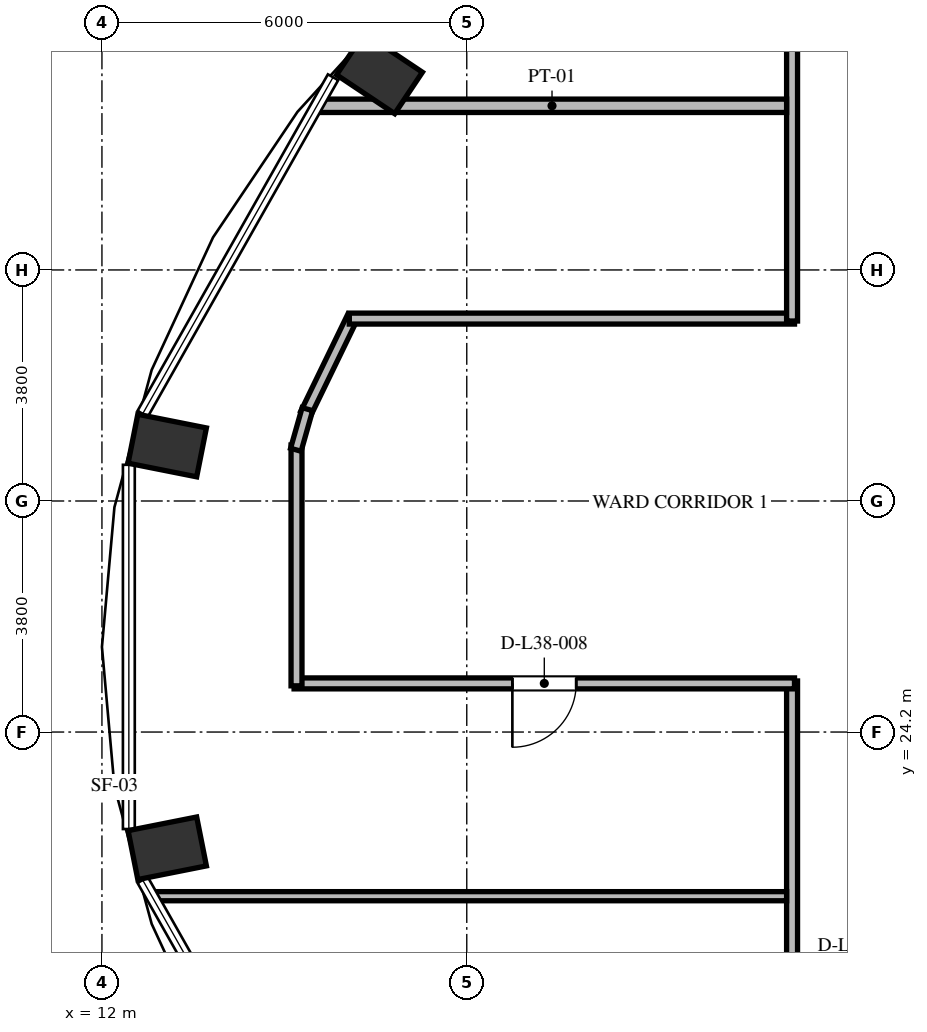
"""IFC4 building model, lengths in metres.
Left out: names, types, materials, properties, quantities, classifications, styles, units other than length and angle.
Written with IfcOpenShell. Run it as: python <this file> out.ifc"""

import sys

from ifc_helpers import new_model, si_unit, direction, frame, frame_2d, origin, origin_2d, place, context, subcontext, project, spatial, rectangle, extrude, element, fill, save


model = new_model("IFC4")
c1 = context("Model", 3, precision=1e-05, world=origin(), true_north=direction((0.0, 1.0)))
c2 = subcontext(c1, "Body", "Model", "MODEL_VIEW")
j1 = project(units=[si_unit("LENGTHUNIT", "METRE"), si_unit("PLANEANGLEUNIT", "RADIAN")], contexts=[c1])
p1 = place(None, origin())
s1 = spatial("IfcSite", under=j1, at=p1, CompositionType="ELEMENT")
p2 = place(p1, origin())
s2 = spatial("IfcBuilding", under=s1, at=p2, CompositionType="ELEMENT")
p3 = place(p2, frame((0.0, 0.0, 149.232)))
s3 = spatial("IfcBuildingStorey", under=s2, at=p3, CompositionType="ELEMENT", Elevation=149.232)
for number, where, z_axis, x_axis in (
    (1, (16.564, 35.031, 0.0), (0.0, 0.0, 1.0), (-0.831, 0.556, 0.0)),
    (2, (13.074, 28.912, 0.0), (0.0, 0.0, 1.0), (-0.981, 0.195, 0.0)),
    (3, (13.074, 22.288, 0.0), (0.0, 0.0, 1.0), (-0.981, -0.195, 0.0)),
):
    element("IfcColumn", number, at=place(p3, frame(where, z_axis=z_axis, x_axis=x_axis)), inside=s3, PredefinedType="COLUMN", context=c2, shape_type="SweptSolid", body=[
        extrude(rectangle(XDim=1.15, YDim=0.82, at=origin_2d()), origin(), (0.0, 0.0, 1.0), 3.648),
    ])
p4 = place(p3, frame((15.35, 29.436, 0.0), z_axis=(0.0, 0.0, 1.0), x_axis=(0.436196025907, 0.899851669434, 0.0)))
e4 = element("IfcWall", 4, at=p4, inside=s3, PredefinedType="PARTITIONING", context=c2, shape_type="SweptSolid", body=[
    extrude(rectangle(XDim=1.778, YDim=0.18, at=frame_2d((0.889, 0.0))), origin(), (0.0, 0.0, 1.0), 3.428),
])
p5 = place(p3, frame((16.068, 31.0, 0.0), z_axis=(0.0, 0.0, 1.0), x_axis=(1.0, 0.0, 0.0)))
e5 = element("IfcWall", 5, at=p5, inside=s3, PredefinedType="PARTITIONING", context=c2, shape_type="SweptSolid", body=[
    extrude(rectangle(XDim=7.322, YDim=0.18, at=frame_2d((3.661, 0.0))), origin(), (0.0, 0.0, 1.0), 3.428),
])
p6 = place(p3, frame((23.35, 30.96, 0.0), z_axis=(0.0, 0.0, 1.0), x_axis=(0.0, 1.0, 0.0)))
e6 = element("IfcWall", 6, at=p6, inside=s3, PredefinedType="PARTITIONING", context=c2, shape_type="SweptSolid", body=[
    extrude(rectangle(XDim=6.714, YDim=0.18, at=frame_2d((3.357, 0.0))), origin(), (0.0, 0.0, 1.0), 3.428),
])
p7 = place(p3, frame((23.35, 19.98, 0.0), z_axis=(0.0, 0.0, 1.0), x_axis=(0.0, 1.0, 0.0)))
e7 = element("IfcWall", 7, at=p7, inside=s3, PredefinedType="PARTITIONING", context=c2, shape_type="SweptSolid", body=[
    extrude(rectangle(XDim=5.06, YDim=0.18, at=frame_2d((2.53, 0.0))), origin(), (0.0, 0.0, 1.0), 3.428),
])
p8 = place(p3, frame((23.39, 25.0, 0.0), z_axis=(0.0, 0.0, 1.0), x_axis=(-1.0, 0.0, 0.0)))
e8 = element("IfcWall", 8, at=p8, inside=s3, PredefinedType="PARTITIONING", context=c2, shape_type="SweptSolid", body=[
    extrude(rectangle(XDim=8.23, YDim=0.18, at=frame_2d((4.115, 0.0))), origin(), (0.0, 0.0, 1.0), 3.428),
])
p9 = place(p8, frame((3.59, 0.0, 0.0)))
e9 = element("IfcOpeningElement", 9, at=p9, cuts=e8, PredefinedType="OPENING", context=c2, shape_type="SweptSolid", body=[
    extrude(rectangle(XDim=1.05, YDim=2.15, at=frame_2d((0.525, 1.075))), frame((0.0, 0.1, 0.0), z_axis=(0.0, -1.0, 0.0), x_axis=(1.0, 0.0, 0.0)), (0.0, 0.0, 1.0), 0.2),
])
p10 = place(p3, frame((15.2, 24.96, 0.0), z_axis=(0.0, 0.0, 1.0), x_axis=(0.0, 1.0, 0.0)))
e10 = element("IfcWall", 10, at=p10, inside=s3, PredefinedType="PARTITIONING", context=c2, shape_type="SweptSolid", body=[
    extrude(rectangle(XDim=3.961, YDim=0.18, at=frame_2d((1.98, 0.0))), origin(), (0.0, 0.0, 1.0), 3.428),
])
p11 = place(p3, frame((15.189, 28.843, 0.0), z_axis=(0.0, 0.0, 1.0), x_axis=(0.272862960331, 0.962052911684, 0.0)))
e11 = element("IfcWall", 11, at=p11, inside=s3, PredefinedType="PARTITIONING", context=c2, shape_type="SweptSolid", body=[
    extrude(rectangle(XDim=0.694, YDim=0.18, at=frame_2d((0.347, 0.0))), origin(), (0.0, 0.0, 1.0), 3.428),
])
p12 = place(p3, frame((12.829, 21.5, 0.0), z_axis=(0.0, 0.0, 1.0), x_axis=(1.0, 0.0, 0.0)))
e12 = element("IfcWall", 12, at=p12, inside=s3, PredefinedType="PARTITIONING", context=c2, shape_type="SweptSolid", body=[
    extrude(rectangle(XDim=10.431, YDim=0.15, at=frame_2d((5.216, 0.0))), origin(), (0.0, 0.0, 1.0), 2.863),
])
p13 = place(p3, frame((15.544, 34.5, 0.0), z_axis=(0.0, 0.0, 1.0), x_axis=(1.0, 0.0, 0.0)))
e13 = element("IfcWall", 13, at=p13, inside=s3, PredefinedType="PARTITIONING", context=c2, shape_type="SweptSolid", body=[
    extrude(rectangle(XDim=7.716, YDim=0.22, at=frame_2d((3.858, 0.0))), origin(), (0.0, 0.0, 1.0), 3.428),
])
p14 = place(p9, origin())
e14 = element("IfcDoor", 14, at=p14, inside=s3, OperationType="SINGLE_SWING_RIGHT", PredefinedType="DOOR", context=c2, shape_type="SweptSolid", body=[
    extrude(rectangle(XDim=1.05, YDim=2.15, at=frame_2d((0.525, 1.075))), frame((0.0, 0.025, 0.0), z_axis=(0.0, -1.0, 0.0), x_axis=(1.0, 0.0, 0.0)), (0.0, 0.0, 1.0), 0.05),
])
fill(e9, e14)
save(model, sys.argv[1])
